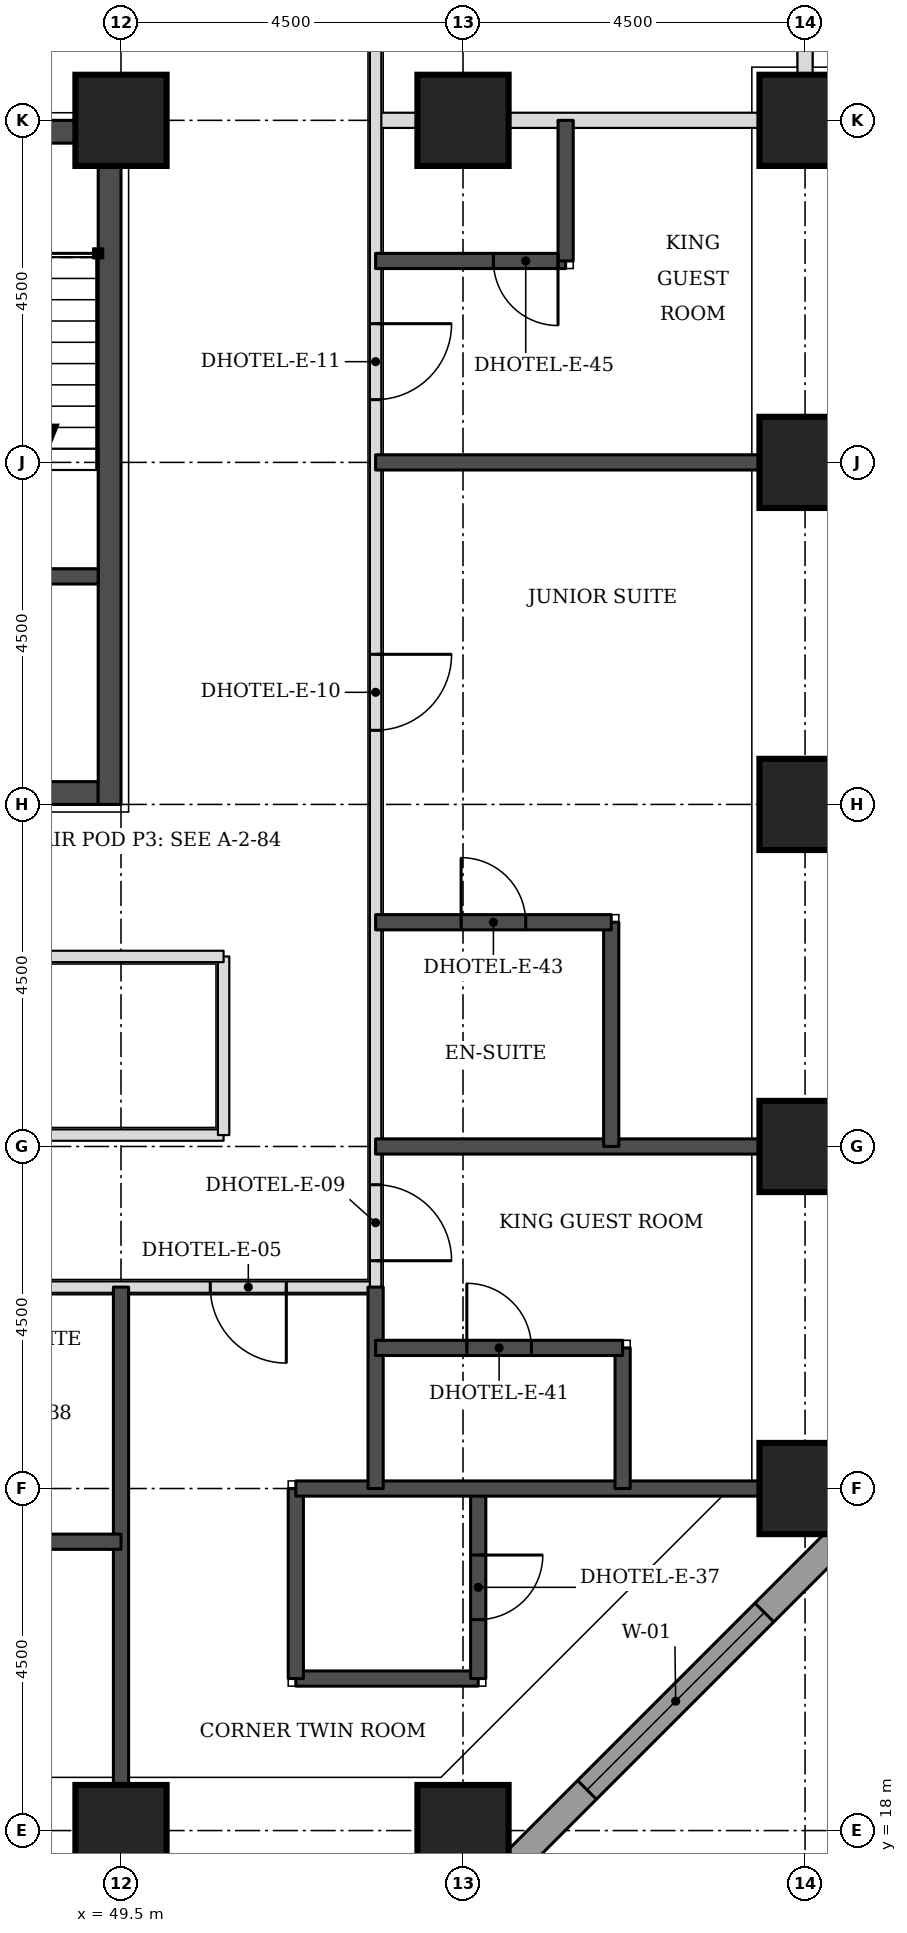
"""IFC4 building model, lengths in metres.
Left out: names, types, materials, properties, quantities, classifications, styles, units other than length and angle.
Written with IfcOpenShell. Run it as: python <this file> out.ifc"""

import sys

from ifc_helpers import new_model, si_unit, direction, frame, frame_2d, origin, origin_2d, place, context, subcontext, project, spatial, rectangle, extrude, element, fill, save


model = new_model("IFC4")
c1 = context("Model", 3, precision=1e-05, world=origin(), true_north=direction((0.0, 1.0)))
c2 = subcontext(c1, "Body", "Model", "MODEL_VIEW")
j1 = project(units=[si_unit("LENGTHUNIT", "METRE"), si_unit("PLANEANGLEUNIT", "RADIAN")], contexts=[c1])
p1 = place(None, origin())
s1 = spatial("IfcSite", under=j1, at=p1, CompositionType="ELEMENT")
p2 = place(p1, origin())
s2 = spatial("IfcBuilding", under=s1, at=p2, CompositionType="ELEMENT")
p3 = place(p2, frame((0.0, 0.0, 62.7)))
s3 = spatial("IfcBuildingStorey", under=s2, at=p3, CompositionType="ELEMENT", Elevation=62.7)
for number, where, z_axis, x_axis in (
    (1, (49.5, 18.0, 0.0), (0.0, 0.0, 1.0), (1.0, 0.0, 0.0)),
    (2, (54.0, 18.0, 0.0), (0.0, 0.0, 1.0), (1.0, 0.0, 0.0)),
    (3, (58.5, 22.5, 0.0), (0.0, 0.0, 1.0), (1.0, 0.0, 0.0)),
    (4, (58.5, 27.0, 0.0), (0.0, 0.0, 1.0), (1.0, 0.0, 0.0)),
    (5, (58.5, 31.5, 0.0), (0.0, 0.0, 1.0), (1.0, 0.0, 0.0)),
    (6, (58.5, 36.0, 0.0), (0.0, 0.0, 1.0), (1.0, 0.0, 0.0)),
    (7, (49.5, 40.5, 0.0), (0.0, 0.0, 1.0), (1.0, 0.0, 0.0)),
    (8, (54.0, 40.5, 0.0), (0.0, 0.0, 1.0), (1.0, 0.0, 0.0)),
    (9, (58.5, 40.5, 0.0), (0.0, 0.0, 1.0), (1.0, 0.0, 0.0)),
):
    element("IfcColumn", number, at=place(p3, frame(where, z_axis=z_axis, x_axis=x_axis)), inside=s3, PredefinedType="COLUMN", context=c2, shape_type="SweptSolid", body=[
        extrude(rectangle(XDim=1.2, YDim=1.2, at=origin_2d()), origin(), (0.0, 0.0, 1.0), 3.3),
    ])
p4 = place(p3, frame((40.8, 31.65, 0.0), z_axis=(0.0, 0.0, 1.0), x_axis=(1.0, 0.0, 0.0)))
e10 = element("IfcWall", 10, at=p4, inside=s3, PredefinedType="SHEAR", context=c2, shape_type="SweptSolid", body=[
    extrude(rectangle(XDim=8.4, YDim=0.3, at=frame_2d((4.2, 0.0))), origin(), (0.0, 0.0, 1.0), 3.3),
])
p5 = place(p4, frame((5.2, 0.0, 0.0)))
e11 = element("IfcOpeningElement", 11, at=p5, cuts=e10, PredefinedType="OPENING", context=c2, shape_type="SweptSolid", body=[
    extrude(rectangle(XDim=1.0, YDim=2.1, at=frame_2d((0.5, 1.05))), frame((0.0, 0.16, 0.0), z_axis=(0.0, -1.0, 0.0), x_axis=(1.0, 0.0, 0.0)), (0.0, 0.0, 1.0), 0.32),
])
p6 = place(p3, frame((40.8, 40.35, 0.0), z_axis=(0.0, 0.0, 1.0), x_axis=(1.0, 0.0, 0.0)))
e12 = element("IfcWall", 12, at=p6, inside=s3, PredefinedType="SHEAR", context=c2, shape_type="SweptSolid", body=[
    extrude(rectangle(XDim=8.4, YDim=0.3, at=frame_2d((4.2, 0.0))), origin(), (0.0, 0.0, 1.0), 3.3),
])
p7 = place(p6, frame((6.4, 0.0, 0.0)))
e13 = element("IfcOpeningElement", 13, at=p7, cuts=e12, PredefinedType="OPENING", context=c2, shape_type="SweptSolid", body=[
    extrude(rectangle(XDim=1.1, YDim=2.1, at=frame_2d((0.55, 1.05))), frame((0.0, 0.16, 0.0), z_axis=(0.0, -1.0, 0.0), x_axis=(1.0, 0.0, 0.0)), (0.0, 0.0, 1.0), 0.32),
])
p8 = place(p3, frame((49.35, 31.5, 0.0), z_axis=(0.0, 0.0, 1.0), x_axis=(0.0, 1.0, 0.0)))
e14 = element("IfcWall", 14, at=p8, inside=s3, PredefinedType="SHEAR", context=c2, shape_type="SweptSolid", body=[
    extrude(rectangle(XDim=9.0, YDim=0.3, at=frame_2d((4.5, 0.0))), origin(), (0.0, 0.0, 1.0), 3.3),
])
p9 = place(p3, frame((54.27, 17.174, 0.0), z_axis=(0.0, 0.0, 1.0), x_axis=(0.707106781187, 0.707106781187, 0.0)))
e15 = element("IfcWall", 15, at=p9, inside=s3, PredefinedType="STANDARD", context=c2, shape_type="SweptSolid", body=[
    extrude(rectangle(XDim=7.151, YDim=0.35, at=frame_2d((3.576, 0.0))), origin(), (0.0, 0.0, 1.0), 3.055),
])
p10 = place(p9, frame((1.926, 0.0, 0.8)))
e16 = element("IfcOpeningElement", 16, at=p10, cuts=e15, PredefinedType="OPENING", context=c2, shape_type="SweptSolid", body=[
    extrude(rectangle(XDim=3.3, YDim=1.5, at=frame_2d((1.65, 0.75))), frame((0.0, 0.185, 0.0), z_axis=(0.0, -1.0, 0.0), x_axis=(1.0, 0.0, 0.0)), (0.0, 0.0, 1.0), 0.37),
])
p11 = place(p3, frame((52.85, 40.5, 0.0), z_axis=(0.0, 0.0, 1.0), x_axis=(1.0, 0.0, 0.0)))
e17 = element("IfcWall", 17, at=p11, inside=s3, PredefinedType="PARTITIONING", context=c2, shape_type="SweptSolid", body=[
    extrude(rectangle(XDim=5.05, YDim=0.2, at=frame_2d((2.525, 0.0))), origin(), (0.0, 0.0, 1.0), 2.33),
])
p12 = place(p3, frame((58.5, 41.1, 0.0), z_axis=(0.0, 0.0, 1.0), x_axis=(0.0, 1.0, 0.0)))
e18 = element("IfcWall", 18, at=p12, inside=s3, PredefinedType="PARTITIONING", context=c2, shape_type="SweptSolid", body=[
    extrude(rectangle(XDim=6.4, YDim=0.2, at=frame_2d((3.2, 0.0))), origin(), (0.0, 0.0, 1.0), 3.08),
])
p13 = place(p3, frame((20.65, 25.15, 0.0), z_axis=(0.0, 0.0, 1.0), x_axis=(1.0, 0.0, 0.0)))
e19 = element("IfcWall", 19, at=p13, inside=s3, PredefinedType="PARTITIONING", context=c2, shape_type="SweptSolid", body=[
    extrude(rectangle(XDim=32.2, YDim=0.15, at=frame_2d((16.1, 0.0))), origin(), (0.0, 0.0, 1.0), 3.08),
])
p14 = place(p13, frame((4.375, 0.0, 0.0)))
e20 = element("IfcOpeningElement", 20, at=p14, cuts=e19, PredefinedType="OPENING", context=c2, shape_type="SweptSolid", body=[
    extrude(rectangle(XDim=1.0, YDim=2.1, at=frame_2d((0.5, 1.05))), frame((0.0, 0.085, 0.0), z_axis=(0.0, -1.0, 0.0), x_axis=(1.0, 0.0, 0.0)), (0.0, 0.0, 1.0), 0.17),
])
p15 = place(p13, frame((16.075, 0.0, 0.0)))
e21 = element("IfcOpeningElement", 21, at=p15, cuts=e19, PredefinedType="OPENING", context=c2, shape_type="SweptSolid", body=[
    extrude(rectangle(XDim=1.0, YDim=2.1, at=frame_2d((0.5, 1.05))), frame((0.0, 0.085, 0.0), z_axis=(0.0, -1.0, 0.0), x_axis=(1.0, 0.0, 0.0)), (0.0, 0.0, 1.0), 0.17),
])
p16 = place(p13, frame((22.375, 0.0, 0.0)))
e22 = element("IfcOpeningElement", 22, at=p16, cuts=e19, PredefinedType="OPENING", context=c2, shape_type="SweptSolid", body=[
    extrude(rectangle(XDim=1.0, YDim=2.1, at=frame_2d((0.5, 1.05))), frame((0.0, 0.085, 0.0), z_axis=(0.0, -1.0, 0.0), x_axis=(1.0, 0.0, 0.0)), (0.0, 0.0, 1.0), 0.17),
])
p17 = place(p13, frame((0.425, 0.0, 0.0)))
e23 = element("IfcOpeningElement", 23, at=p17, cuts=e19, PredefinedType="OPENING", context=c2, shape_type="SweptSolid", body=[
    extrude(rectangle(XDim=1.0, YDim=2.1, at=frame_2d((0.5, 1.05))), frame((0.0, 0.085, 0.0), z_axis=(0.0, -1.0, 0.0), x_axis=(1.0, 0.0, 0.0)), (0.0, 0.0, 1.0), 0.17),
])
p18 = place(p13, frame((30.025, 0.0, 0.0)))
e24 = element("IfcOpeningElement", 24, at=p18, cuts=e19, PredefinedType="OPENING", context=c2, shape_type="SweptSolid", body=[
    extrude(rectangle(XDim=1.0, YDim=2.1, at=frame_2d((0.5, 1.05))), frame((0.0, 0.085, 0.0), z_axis=(0.0, -1.0, 0.0), x_axis=(1.0, 0.0, 0.0)), (0.0, 0.0, 1.0), 0.17),
])
p19 = place(p3, frame((52.85, 25.15, 0.0), z_axis=(0.0, 0.0, 1.0), x_axis=(0.0, 1.0, 0.0)))
e25 = element("IfcWall", 25, at=p19, inside=s3, PredefinedType="PARTITIONING", context=c2, shape_type="SweptSolid", body=[
    extrude(rectangle(XDim=22.35, YDim=0.15, at=frame_2d((11.175, 0.0))), origin(), (0.0, 0.0, 1.0), 3.08),
])
p20 = place(p19, frame((0.347, 0.0, 0.0)))
e26 = element("IfcOpeningElement", 26, at=p20, cuts=e25, PredefinedType="OPENING", context=c2, shape_type="SweptSolid", body=[
    extrude(rectangle(XDim=1.0, YDim=2.1, at=frame_2d((0.5, 1.05))), frame((0.0, 0.085, 0.0), z_axis=(0.0, -1.0, 0.0), x_axis=(1.0, 0.0, 0.0)), (0.0, 0.0, 1.0), 0.17),
])
p21 = place(p19, frame((7.325, 0.0, 0.0)))
e27 = element("IfcOpeningElement", 27, at=p21, cuts=e25, PredefinedType="OPENING", context=c2, shape_type="SweptSolid", body=[
    extrude(rectangle(XDim=1.0, YDim=2.1, at=frame_2d((0.5, 1.05))), frame((0.0, 0.085, 0.0), z_axis=(0.0, -1.0, 0.0), x_axis=(1.0, 0.0, 0.0)), (0.0, 0.0, 1.0), 0.17),
])
p22 = place(p19, frame((11.675, 0.0, 0.0)))
e28 = element("IfcOpeningElement", 28, at=p22, cuts=e25, PredefinedType="OPENING", context=c2, shape_type="SweptSolid", body=[
    extrude(rectangle(XDim=1.0, YDim=2.1, at=frame_2d((0.5, 1.05))), frame((0.0, 0.085, 0.0), z_axis=(0.0, -1.0, 0.0), x_axis=(1.0, 0.0, 0.0)), (0.0, 0.0, 1.0), 0.17),
])
p23 = place(p19, frame((18.4, 0.0, 0.0)))
e29 = element("IfcOpeningElement", 29, at=p23, cuts=e25, PredefinedType="OPENING", context=c2, shape_type="SweptSolid", body=[
    extrude(rectangle(XDim=0.9, YDim=2.1, at=frame_2d((0.45, 1.05))), frame((0.0, 0.085, 0.0), z_axis=(0.0, -1.0, 0.0), x_axis=(1.0, 0.0, 0.0)), (0.0, 0.0, 1.0), 0.17),
])
p24 = place(p3, frame((40.5, 27.15, 0.0), z_axis=(0.0, 0.0, 1.0), x_axis=(1.0, 0.0, 0.0)))
e30 = element("IfcWall", 30, at=p24, inside=s3, PredefinedType="PARTITIONING", context=c2, shape_type="SweptSolid", body=[
    extrude(rectangle(XDim=10.35, YDim=0.15, at=frame_2d((5.175, 0.0))), origin(), (0.0, 0.0, 1.0), 3.08),
])
p25 = place(p3, frame((50.85, 27.15, 0.0), z_axis=(0.0, 0.0, 1.0), x_axis=(0.0, 1.0, 0.0)))
e31 = element("IfcWall", 31, at=p25, inside=s3, PredefinedType="PARTITIONING", context=c2, shape_type="SweptSolid", body=[
    extrude(rectangle(XDim=2.35, YDim=0.15, at=frame_2d((1.175, 0.0))), origin(), (0.0, 0.0, 1.0), 3.08),
])
p26 = place(p3, frame((40.5, 29.5, 0.0), z_axis=(0.0, 0.0, 1.0), x_axis=(1.0, 0.0, 0.0)))
e32 = element("IfcWall", 32, at=p26, inside=s3, PredefinedType="PARTITIONING", context=c2, shape_type="SweptSolid", body=[
    extrude(rectangle(XDim=10.35, YDim=0.15, at=frame_2d((5.175, 0.0))), origin(), (0.0, 0.0, 1.0), 3.08),
])
p27 = place(p26, frame((4.725, 0.0, 0.0)))
e33 = element("IfcOpeningElement", 33, at=p27, cuts=e32, PredefinedType="OPENING", context=c2, shape_type="SweptSolid", body=[
    extrude(rectangle(XDim=0.9, YDim=2.1, at=frame_2d((0.45, 1.05))), frame((0.0, 0.085, 0.0), z_axis=(0.0, -1.0, 0.0), x_axis=(1.0, 0.0, 0.0)), (0.0, 0.0, 1.0), 0.17),
])
p28 = place(p3, frame((49.5, 18.6, 0.0), z_axis=(0.0, 0.0, 1.0), x_axis=(0.0, 1.0, 0.0)))
e34 = element("IfcWall", 34, at=p28, inside=s3, PredefinedType="SOLIDWALL", context=c2, shape_type="SweptSolid", body=[
    extrude(rectangle(XDim=6.55, YDim=0.2, at=frame_2d((3.275, 0.0))), origin(), (0.0, 0.0, 1.0), 3.08),
])
p29 = place(p3, frame((51.8, 20.0, 0.0), z_axis=(0.0, 0.0, 1.0), x_axis=(1.0, 0.0, 0.0)))
e35 = element("IfcWall", 35, at=p29, inside=s3, PredefinedType="SOLIDWALL", context=c2, shape_type="SweptSolid", body=[
    extrude(rectangle(XDim=2.4, YDim=0.2, at=frame_2d((1.2, 0.0))), origin(), (0.0, 0.0, 1.0), 3.08),
])
p30 = place(p3, frame((51.8, 20.0, 0.0), z_axis=(0.0, 0.0, 1.0), x_axis=(0.0, 1.0, 0.0)))
e36 = element("IfcWall", 36, at=p30, inside=s3, PredefinedType="SOLIDWALL", context=c2, shape_type="SweptSolid", body=[
    extrude(rectangle(XDim=2.5, YDim=0.2, at=frame_2d((1.25, 0.0))), origin(), (0.0, 0.0, 1.0), 3.08),
])
p31 = place(p3, frame((54.2, 20.0, 0.0), z_axis=(0.0, 0.0, 1.0), x_axis=(0.0, 1.0, 0.0)))
e37 = element("IfcWall", 37, at=p31, inside=s3, PredefinedType="SOLIDWALL", context=c2, shape_type="SweptSolid", body=[
    extrude(rectangle(XDim=2.5, YDim=0.2, at=frame_2d((1.25, 0.0))), origin(), (0.0, 0.0, 1.0), 3.08),
])
p32 = place(p31, frame((0.775, 0.0, 0.0)))
e38 = element("IfcOpeningElement", 38, at=p32, cuts=e37, PredefinedType="OPENING", context=c2, shape_type="SweptSolid", body=[
    extrude(rectangle(XDim=0.85, YDim=2.1, at=frame_2d((0.425, 1.05))), frame((0.0, 0.11, 0.0), z_axis=(0.0, -1.0, 0.0), x_axis=(1.0, 0.0, 0.0)), (0.0, 0.0, 1.0), 0.22),
])
p33 = place(p3, frame((46.55, 21.8, 0.0), z_axis=(0.0, 0.0, 1.0), x_axis=(1.0, 0.0, 0.0)))
e39 = element("IfcWall", 39, at=p33, inside=s3, PredefinedType="SOLIDWALL", context=c2, shape_type="SweptSolid", body=[
    extrude(rectangle(XDim=2.95, YDim=0.2, at=frame_2d((1.475, 0.0))), origin(), (0.0, 0.0, 1.0), 3.08),
])
p34 = place(p3, frame((51.8, 22.5, 0.0), z_axis=(0.0, 0.0, 1.0), x_axis=(1.0, 0.0, 0.0)))
e40 = element("IfcWall", 40, at=p34, inside=s3, PredefinedType="SOLIDWALL", context=c2, shape_type="SweptSolid", body=[
    extrude(rectangle(XDim=6.1, YDim=0.2, at=frame_2d((3.05, 0.0))), origin(), (0.0, 0.0, 1.0), 3.08),
])
p35 = place(p3, frame((52.85, 22.5, 0.0), z_axis=(0.0, 0.0, 1.0), x_axis=(0.0, 1.0, 0.0)))
e41 = element("IfcWall", 41, at=p35, inside=s3, PredefinedType="SOLIDWALL", context=c2, shape_type="SweptSolid", body=[
    extrude(rectangle(XDim=2.65, YDim=0.2, at=frame_2d((1.325, 0.0))), origin(), (0.0, 0.0, 1.0), 3.08),
])
p36 = place(p3, frame((56.1, 22.5, 0.0), z_axis=(0.0, 0.0, 1.0), x_axis=(0.0, 1.0, 0.0)))
e42 = element("IfcWall", 42, at=p36, inside=s3, PredefinedType="SOLIDWALL", context=c2, shape_type="SweptSolid", body=[
    extrude(rectangle(XDim=1.85, YDim=0.2, at=frame_2d((0.925, 0.0))), origin(), (0.0, 0.0, 1.0), 3.08),
])
p37 = place(p3, frame((52.85, 24.35, 0.0), z_axis=(0.0, 0.0, 1.0), x_axis=(1.0, 0.0, 0.0)))
e43 = element("IfcWall", 43, at=p37, inside=s3, PredefinedType="SOLIDWALL", context=c2, shape_type="SweptSolid", body=[
    extrude(rectangle(XDim=3.25, YDim=0.2, at=frame_2d((1.625, 0.0))), origin(), (0.0, 0.0, 1.0), 3.08),
])
p38 = place(p37, frame((1.2, 0.0, 0.0)))
e44 = element("IfcOpeningElement", 44, at=p38, cuts=e43, PredefinedType="OPENING", context=c2, shape_type="SweptSolid", body=[
    extrude(rectangle(XDim=0.85, YDim=2.1, at=frame_2d((0.425, 1.05))), frame((0.0, 0.11, 0.0), z_axis=(0.0, -1.0, 0.0), x_axis=(1.0, 0.0, 0.0)), (0.0, 0.0, 1.0), 0.22),
])
p39 = place(p3, frame((52.85, 27.0, 0.0), z_axis=(0.0, 0.0, 1.0), x_axis=(1.0, 0.0, 0.0)))
e45 = element("IfcWall", 45, at=p39, inside=s3, PredefinedType="SOLIDWALL", context=c2, shape_type="SweptSolid", body=[
    extrude(rectangle(XDim=5.05, YDim=0.2, at=frame_2d((2.525, 0.0))), origin(), (0.0, 0.0, 1.0), 3.08),
])
p40 = place(p3, frame((55.95, 27.0, 0.0), z_axis=(0.0, 0.0, 1.0), x_axis=(0.0, 1.0, 0.0)))
e46 = element("IfcWall", 46, at=p40, inside=s3, PredefinedType="SOLIDWALL", context=c2, shape_type="SweptSolid", body=[
    extrude(rectangle(XDim=2.95, YDim=0.2, at=frame_2d((1.475, 0.0))), origin(), (0.0, 0.0, 1.0), 3.08),
])
p41 = place(p3, frame((52.85, 29.95, 0.0), z_axis=(0.0, 0.0, 1.0), x_axis=(1.0, 0.0, 0.0)))
e47 = element("IfcWall", 47, at=p41, inside=s3, PredefinedType="SOLIDWALL", context=c2, shape_type="SweptSolid", body=[
    extrude(rectangle(XDim=3.1, YDim=0.2, at=frame_2d((1.55, 0.0))), origin(), (0.0, 0.0, 1.0), 3.08),
])
p42 = place(p41, frame((1.125, 0.0, 0.0)))
e48 = element("IfcOpeningElement", 48, at=p42, cuts=e47, PredefinedType="OPENING", context=c2, shape_type="SweptSolid", body=[
    extrude(rectangle(XDim=0.85, YDim=2.1, at=frame_2d((0.425, 1.05))), frame((0.0, 0.11, 0.0), z_axis=(0.0, -1.0, 0.0), x_axis=(1.0, 0.0, 0.0)), (0.0, 0.0, 1.0), 0.22),
])
p43 = place(p3, frame((52.85, 36.0, 0.0), z_axis=(0.0, 0.0, 1.0), x_axis=(1.0, 0.0, 0.0)))
e49 = element("IfcWall", 49, at=p43, inside=s3, PredefinedType="SOLIDWALL", context=c2, shape_type="SweptSolid", body=[
    extrude(rectangle(XDim=5.05, YDim=0.2, at=frame_2d((2.525, 0.0))), origin(), (0.0, 0.0, 1.0), 3.08),
])
p44 = place(p3, frame((52.85, 38.65, 0.0), z_axis=(0.0, 0.0, 1.0), x_axis=(1.0, 0.0, 0.0)))
e50 = element("IfcWall", 50, at=p44, inside=s3, PredefinedType="SOLIDWALL", context=c2, shape_type="SweptSolid", body=[
    extrude(rectangle(XDim=2.5, YDim=0.2, at=frame_2d((1.25, 0.0))), origin(), (0.0, 0.0, 1.0), 3.08),
])
p45 = place(p44, frame((1.55, 0.0, 0.0)))
e51 = element("IfcOpeningElement", 51, at=p45, cuts=e50, PredefinedType="OPENING", context=c2, shape_type="SweptSolid", body=[
    extrude(rectangle(XDim=0.85, YDim=2.1, at=frame_2d((0.425, 1.05))), frame((0.0, 0.11, 0.0), z_axis=(0.0, -1.0, 0.0), x_axis=(1.0, 0.0, 0.0)), (0.0, 0.0, 1.0), 0.22),
])
p46 = place(p3, frame((55.35, 38.65, 0.0), z_axis=(0.0, 0.0, 1.0), x_axis=(0.0, 1.0, 0.0)))
e52 = element("IfcWall", 52, at=p46, inside=s3, PredefinedType="SOLIDWALL", context=c2, shape_type="SweptSolid", body=[
    extrude(rectangle(XDim=1.85, YDim=0.2, at=frame_2d((0.925, 0.0))), origin(), (0.0, 0.0, 1.0), 3.08),
])
p47 = place(p3, frame((46.2, 34.5, 0.0), z_axis=(0.0, 0.0, 1.0), x_axis=(1.0, 0.0, 0.0)))
e53 = element("IfcWall", 53, at=p47, inside=s3, PredefinedType="SOLIDWALL", context=c2, shape_type="SweptSolid", body=[
    extrude(rectangle(XDim=3.0, YDim=0.2, at=frame_2d((1.5, 0.0))), origin(), (0.0, 0.0, 1.0), 3.08),
])
p48 = place(p10, origin())
e54 = element("IfcWindow", 54, at=p48, inside=s3, PartitioningType="SINGLE_PANEL", PredefinedType="WINDOW", context=c2, shape_type="SweptSolid", body=[
    extrude(rectangle(XDim=3.3, YDim=1.5, at=frame_2d((1.65, 0.75))), frame((0.0, 0.085, 0.0), z_axis=(0.0, -1.0, 0.0), x_axis=(1.0, 0.0, 0.0)), (0.0, 0.0, 1.0), 0.06),
])
fill(e16, e54)
p49 = place(p20, frame((1.0, 0.0, 0.0), z_axis=(0.0, 0.0, 1.0), x_axis=(-1.0, 0.0, 0.0)))
e55 = element("IfcDoor", 55, at=p49, inside=s3, OperationType="SINGLE_SWING_RIGHT", PredefinedType="DOOR", context=c2, shape_type="SweptSolid", body=[
    extrude(rectangle(XDim=1.0, YDim=2.1, at=frame_2d((0.5, 1.05))), frame((0.0, 0.025, 0.0), z_axis=(0.0, -1.0, 0.0), x_axis=(1.0, 0.0, 0.0)), (0.0, 0.0, 1.0), 0.05),
])
fill(e26, e55)
p50 = place(p38, origin())
e56 = element("IfcDoor", 56, at=p50, inside=s3, OperationType="SINGLE_SWING_LEFT", PredefinedType="DOOR", context=c2, shape_type="SweptSolid", body=[
    extrude(rectangle(XDim=0.85, YDim=2.1, at=frame_2d((0.425, 1.05))), frame((0.0, 0.025, 0.0), z_axis=(0.0, -1.0, 0.0), x_axis=(1.0, 0.0, 0.0)), (0.0, 0.0, 1.0), 0.05),
])
fill(e44, e56)
p51 = place(p21, frame((1.0, 0.0, 0.0), z_axis=(0.0, 0.0, 1.0), x_axis=(-1.0, 0.0, 0.0)))
e57 = element("IfcDoor", 57, at=p51, inside=s3, OperationType="SINGLE_SWING_LEFT", PredefinedType="DOOR", context=c2, shape_type="SweptSolid", body=[
    extrude(rectangle(XDim=1.0, YDim=2.1, at=frame_2d((0.5, 1.05))), frame((0.0, 0.025, 0.0), z_axis=(0.0, -1.0, 0.0), x_axis=(1.0, 0.0, 0.0)), (0.0, 0.0, 1.0), 0.05),
])
fill(e27, e57)
p52 = place(p42, origin())
e58 = element("IfcDoor", 58, at=p52, inside=s3, OperationType="SINGLE_SWING_LEFT", PredefinedType="DOOR", context=c2, shape_type="SweptSolid", body=[
    extrude(rectangle(XDim=0.85, YDim=2.1, at=frame_2d((0.425, 1.05))), frame((0.0, 0.025, 0.0), z_axis=(0.0, -1.0, 0.0), x_axis=(1.0, 0.0, 0.0)), (0.0, 0.0, 1.0), 0.05),
])
fill(e48, e58)
p53 = place(p22, frame((1.0, 0.0, 0.0), z_axis=(0.0, 0.0, 1.0), x_axis=(-1.0, 0.0, 0.0)))
e59 = element("IfcDoor", 59, at=p53, inside=s3, OperationType="SINGLE_SWING_LEFT", PredefinedType="DOOR", context=c2, shape_type="SweptSolid", body=[
    extrude(rectangle(XDim=1.0, YDim=2.1, at=frame_2d((0.5, 1.05))), frame((0.0, 0.025, 0.0), z_axis=(0.0, -1.0, 0.0), x_axis=(1.0, 0.0, 0.0)), (0.0, 0.0, 1.0), 0.05),
])
fill(e28, e59)
p54 = place(p45, frame((0.85, 0.0, 0.0), z_axis=(0.0, 0.0, 1.0), x_axis=(-1.0, 0.0, 0.0)))
e60 = element("IfcDoor", 60, at=p54, inside=s3, OperationType="SINGLE_SWING_LEFT", PredefinedType="DOOR", context=c2, shape_type="SweptSolid", body=[
    extrude(rectangle(XDim=0.85, YDim=2.1, at=frame_2d((0.425, 1.05))), frame((0.0, 0.025, 0.0), z_axis=(0.0, -1.0, 0.0), x_axis=(1.0, 0.0, 0.0)), (0.0, 0.0, 1.0), 0.05),
])
fill(e51, e60)
p55 = place(p18, frame((1.0, 0.0, 0.0), z_axis=(0.0, 0.0, 1.0), x_axis=(-1.0, 0.0, 0.0)))
e61 = element("IfcDoor", 61, at=p55, inside=s3, OperationType="SINGLE_SWING_LEFT", PredefinedType="DOOR", context=c2, shape_type="SweptSolid", body=[
    extrude(rectangle(XDim=1.0, YDim=2.1, at=frame_2d((0.5, 1.05))), frame((0.0, 0.025, 0.0), z_axis=(0.0, -1.0, 0.0), x_axis=(1.0, 0.0, 0.0)), (0.0, 0.0, 1.0), 0.05),
])
fill(e24, e61)
p56 = place(p32, frame((0.85, 0.0, 0.0), z_axis=(0.0, 0.0, 1.0), x_axis=(-1.0, 0.0, 0.0)))
e62 = element("IfcDoor", 62, at=p56, inside=s3, OperationType="SINGLE_SWING_LEFT", PredefinedType="DOOR", context=c2, shape_type="SweptSolid", body=[
    extrude(rectangle(XDim=0.85, YDim=2.1, at=frame_2d((0.425, 1.05))), frame((0.0, 0.025, 0.0), z_axis=(0.0, -1.0, 0.0), x_axis=(1.0, 0.0, 0.0)), (0.0, 0.0, 1.0), 0.05),
])
fill(e38, e62)
save(model, sys.argv[1])
